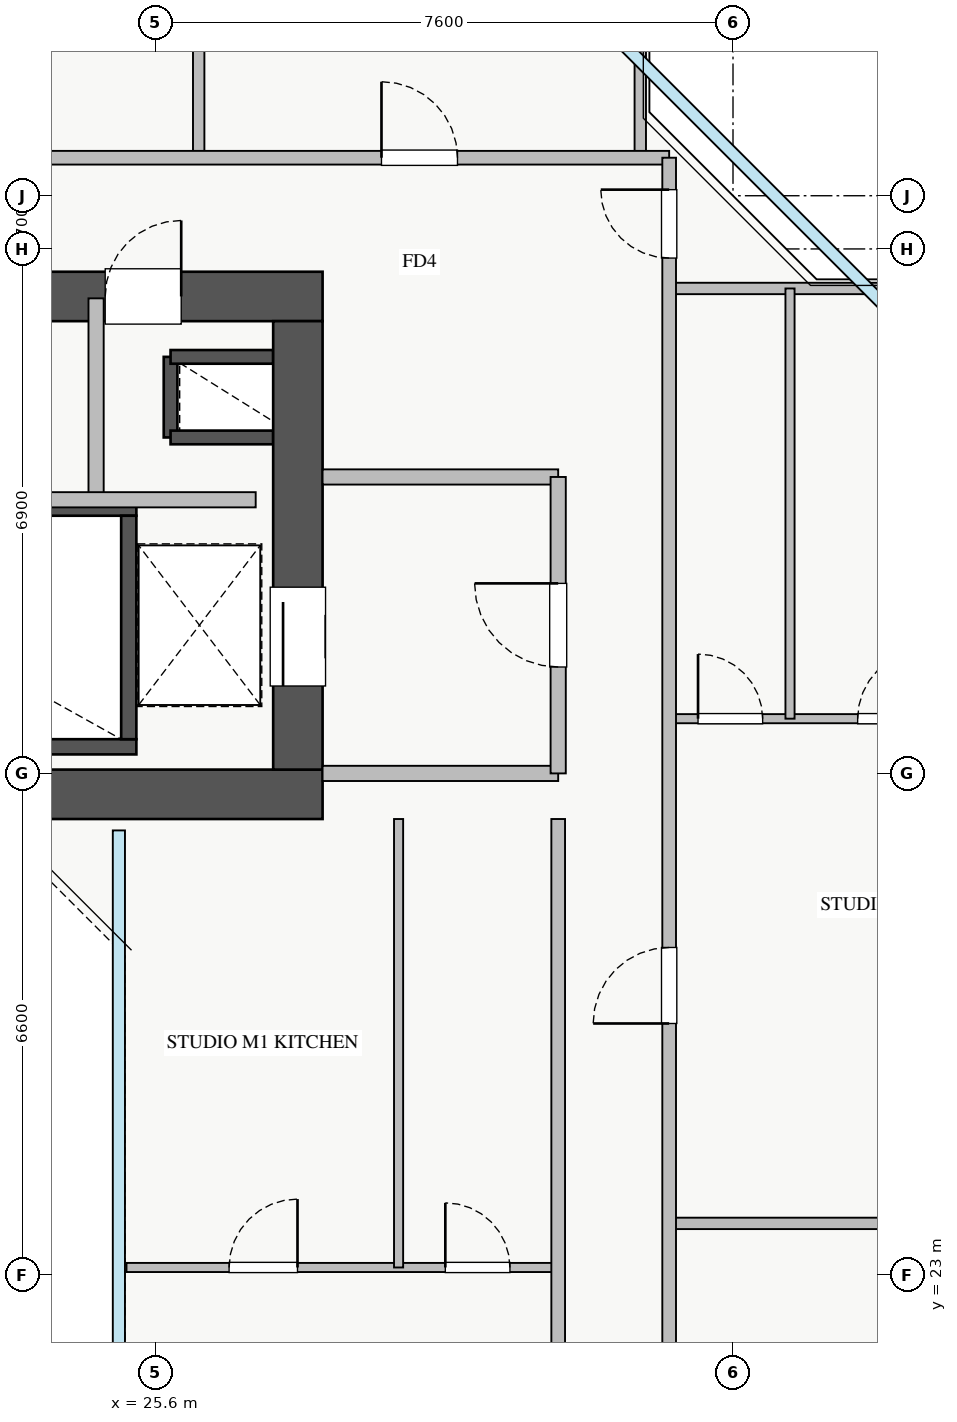
"""IFC4 building model, lengths in metres.
Left out: names, types, materials, properties, quantities, classifications, styles, units other than length and angle.
Written with IfcOpenShell. Run it as: python <this file> out.ifc"""

import sys

from ifc_helpers import new_model, si_unit, direction, frame, frame_2d, origin, place, context, subcontext, project, spatial, rectangle, extrude, source, transform, mapped, element, fill, save


model = new_model("IFC4")
c1 = context("Model", 3, precision=1e-05, world=origin(), true_north=direction((0.0, 1.0)))
c2 = subcontext(c1, "Body", "Model", "MODEL_VIEW")
j1 = project(units=[si_unit("LENGTHUNIT", "METRE"), si_unit("PLANEANGLEUNIT", "RADIAN")], contexts=[c1])
p1 = place(None, origin())
s1 = spatial("IfcSite", under=j1, at=p1, CompositionType="ELEMENT")
p2 = place(p1, origin())
s2 = spatial("IfcBuilding", under=s1, at=p2, CompositionType="ELEMENT")
p3 = place(p2, frame((0.0, 0.0, 150.25)))
s3 = spatial("IfcBuildingStorey", under=s2, at=p3, CompositionType="ELEMENT", Elevation=150.25)
p4 = place(p3, frame((25.8, 34.02, 0.0), z_axis=(0.0, 0.0, 1.0), x_axis=(0.0, 1.0, 0.0)))
e1 = element("IfcWall", 1, at=p4, inside=s3, PredefinedType="SHEAR", context=c2, shape_type="SweptSolid", body=[
    extrude(rectangle(XDim=1.06, YDim=0.18, at=frame_2d((0.53, 0.0))), origin(), (0.0, 0.0, 1.0), 3.07),
])
for number, where, z_axis, x_axis in (
    (2, (25.8, 35.08, 0.0), (0.0, 0.0, 1.0), (1.0, 0.0, 0.0)),
    (3, (25.8, 34.02, 0.0), (0.0, 0.0, 1.0), (1.0, 0.0, 0.0)),
):
    element("IfcWall", number, at=place(p3, frame(where, z_axis=z_axis, x_axis=x_axis)), inside=s3, PredefinedType="SHEAR", context=c2, shape_type="SweptSolid", body=[
        extrude(rectangle(XDim=1.35, YDim=0.18, at=frame_2d((0.675, 0.0))), origin(), (0.0, 0.0, 1.0), 3.07),
    ])
p5 = place(p3, frame((18.2, 29.95, 0.0), z_axis=(0.0, 0.0, 1.0), x_axis=(1.0, 0.0, 0.0)))
e4 = element("IfcWall", 4, at=p5, inside=s3, PredefinedType="SHEAR", context=c2, shape_type="SweptSolid", body=[
    extrude(rectangle(XDim=7.15, YDim=0.2, at=frame_2d((3.575, 0.0))), origin(), (0.0, 0.0, 1.0), 3.25),
])
p6 = place(p3, frame((18.2, 33.09, 0.0), z_axis=(0.0, 0.0, 1.0), x_axis=(1.0, 0.0, 0.0)))
e5 = element("IfcWall", 5, at=p6, inside=s3, PredefinedType="SHEAR", context=c2, shape_type="SweptSolid", body=[
    extrude(rectangle(XDim=7.15, YDim=0.2, at=frame_2d((3.575, 0.0))), origin(), (0.0, 0.0, 1.0), 3.25),
])
p7 = place(p6, frame((0.35, 0.0, 0.0)))
e6 = element("IfcOpeningElement", 6, at=p7, cuts=e5, PredefinedType="OPENING", context=c2, shape_type="SweptSolid", body=[
    extrude(rectangle(XDim=1.1, YDim=2.05, at=frame_2d((0.55, 1.025))), frame((0.0, 0.11, 0.0), z_axis=(0.0, -1.0, 0.0), x_axis=(1.0, 0.0, 0.0)), (0.0, 0.0, 1.0), 0.22),
])
p8 = place(p3, frame((25.25, 30.05, 0.0), z_axis=(0.0, 0.0, 1.0), x_axis=(0.0, 1.0, 0.0)))
e7 = element("IfcWall", 7, at=p8, inside=s3, PredefinedType="SHEAR", context=c2, shape_type="SweptSolid", body=[
    extrude(rectangle(XDim=2.94, YDim=0.2, at=frame_2d((1.47, 0.0))), origin(), (0.0, 0.0, 1.0), 3.25),
])
p9 = place(p3, frame((10.2, 29.325, 0.0), z_axis=(0.0, 0.0, 1.0), x_axis=(1.0, 0.0, 0.0)))
e8 = element("IfcWall", 8, at=p9, inside=s3, PredefinedType="SHEAR", context=c2, shape_type="SweptSolid", body=[
    extrude(rectangle(XDim=17.6, YDim=0.65, at=frame_2d((8.8, 0.0))), origin(), (0.0, 0.0, 1.0), 3.25),
])
p10 = place(p3, frame((10.2, 35.875, 0.0), z_axis=(0.0, 0.0, 1.0), x_axis=(1.0, 0.0, 0.0)))
e9 = element("IfcWall", 9, at=p10, inside=s3, PredefinedType="SHEAR", context=c2, shape_type="SweptSolid", body=[
    extrude(rectangle(XDim=17.6, YDim=0.65, at=frame_2d((8.8, 0.0))), origin(), (0.0, 0.0, 1.0), 3.25),
])
p11 = place(p10, frame((1.15, 0.0, 0.0)))
e10 = element("IfcOpeningElement", 10, at=p11, cuts=e9, PredefinedType="OPENING", context=c2, shape_type="SweptSolid", body=[
    extrude(rectangle(XDim=1.1, YDim=2.05, at=frame_2d((0.55, 1.025))), frame((0.0, 0.335, 0.0), z_axis=(0.0, -1.0, 0.0), x_axis=(1.0, 0.0, 0.0)), (0.0, 0.0, 1.0), 0.67),
])
p12 = place(p10, frame((8.3, 0.0, 0.0)))
e11 = element("IfcOpeningElement", 11, at=p12, cuts=e9, PredefinedType="OPENING", context=c2, shape_type="SweptSolid", body=[
    extrude(rectangle(XDim=1.1, YDim=2.05, at=frame_2d((0.55, 1.025))), frame((0.0, 0.335, 0.0), z_axis=(0.0, -1.0, 0.0), x_axis=(1.0, 0.0, 0.0)), (0.0, 0.0, 1.0), 0.67),
])
p13 = place(p10, frame((4.9, 0.0, 0.0)))
e12 = element("IfcOpeningElement", 12, at=p13, cuts=e9, PredefinedType="OPENING", context=c2, shape_type="SweptSolid", body=[
    extrude(rectangle(XDim=1.1, YDim=2.05, at=frame_2d((0.55, 1.025))), frame((0.0, 0.335, 0.0), z_axis=(0.0, -1.0, 0.0), x_axis=(1.0, 0.0, 0.0)), (0.0, 0.0, 1.0), 0.67),
])
p14 = place(p10, frame((14.74, 0.0, 0.0)))
e13 = element("IfcOpeningElement", 13, at=p14, cuts=e9, PredefinedType="OPENING", context=c2, shape_type="SweptSolid", body=[
    extrude(rectangle(XDim=1.0, YDim=2.05, at=frame_2d((0.5, 1.025))), frame((0.0, 0.335, 0.0), z_axis=(0.0, -1.0, 0.0), x_axis=(1.0, 0.0, 0.0)), (0.0, 0.0, 1.0), 0.67),
])
p15 = place(p10, frame((10.25, 0.0, 0.0)))
e14 = element("IfcOpeningElement", 14, at=p15, cuts=e9, PredefinedType="OPENING", context=c2, shape_type="SweptSolid", body=[
    extrude(rectangle(XDim=1.0, YDim=2.05, at=frame_2d((0.5, 1.025))), frame((0.0, 0.335, 0.0), z_axis=(0.0, -1.0, 0.0), x_axis=(1.0, 0.0, 0.0)), (0.0, 0.0, 1.0), 0.67),
])
p16 = place(p10, frame((12.7, 0.0, 0.0)))
e15 = element("IfcOpeningElement", 15, at=p16, cuts=e9, PredefinedType="OPENING", context=c2, shape_type="SweptSolid", body=[
    extrude(rectangle(XDim=1.0, YDim=2.05, at=frame_2d((0.5, 1.025))), frame((0.0, 0.335, 0.0), z_axis=(0.0, -1.0, 0.0), x_axis=(1.0, 0.0, 0.0)), (0.0, 0.0, 1.0), 0.67),
])
p17 = place(p3, frame((27.475, 29.65, 0.0), z_axis=(0.0, 0.0, 1.0), x_axis=(0.0, 1.0, 0.0)))
e16 = element("IfcWall", 16, at=p17, inside=s3, PredefinedType="SHEAR", context=c2, shape_type="SweptSolid", body=[
    extrude(rectangle(XDim=5.9, YDim=0.65, at=frame_2d((2.95, 0.0))), origin(), (0.0, 0.0, 1.0), 3.25),
])
p18 = place(p17, frame((1.1, 0.0, 0.0)))
e17 = element("IfcOpeningElement", 17, at=p18, cuts=e16, PredefinedType="OPENING", context=c2, shape_type="SweptSolid", body=[
    extrude(rectangle(XDim=1.3, YDim=2.05, at=frame_2d((0.65, 1.025))), frame((0.0, 0.335, 0.0), z_axis=(0.0, -1.0, 0.0), x_axis=(1.0, 0.0, 0.0)), (0.0, 0.0, 1.0), 0.67),
])
for number, where, z_axis, x_axis in (
    (18, (27.8, 29.6, 0.0), (0.0, 0.0, 1.0), (1.0, 0.0, 0.0)),
    (19, (27.8, 33.5, 0.0), (0.0, 0.0, 1.0), (1.0, 0.0, 0.0)),
):
    element("IfcWall", number, at=place(p3, frame(where, z_axis=z_axis, x_axis=x_axis)), inside=s3, PredefinedType="PARTITIONING", context=c2, shape_type="SweptSolid", body=[
        extrude(rectangle(XDim=3.1, YDim=0.2, at=frame_2d((1.55, 0.0))), origin(), (0.0, 0.0, 1.0), 3.07),
    ])
p19 = place(p3, frame((30.9, 29.6, 0.0), z_axis=(0.0, 0.0, 1.0), x_axis=(0.0, 1.0, 0.0)))
e20 = element("IfcWall", 20, at=p19, inside=s3, PredefinedType="PARTITIONING", context=c2, shape_type="SweptSolid", body=[
    extrude(rectangle(XDim=3.9, YDim=0.2, at=frame_2d((1.95, 0.0))), origin(), (0.0, 0.0, 1.0), 3.07),
])
p20 = place(p19, frame((1.4, 0.0, 0.0)))
e21 = element("IfcOpeningElement", 21, at=p20, cuts=e20, PredefinedType="OPENING", context=c2, shape_type="SweptSolid", body=[
    extrude(rectangle(XDim=1.1, YDim=2.05, at=frame_2d((0.55, 1.025))), frame((0.0, 0.11, 0.0), z_axis=(0.0, -1.0, 0.0), x_axis=(1.0, 0.0, 0.0)), (0.0, 0.0, 1.0), 0.22),
])
p21 = place(p3, frame((24.82, 33.2, 0.0), z_axis=(0.0, 0.0, 1.0), x_axis=(0.0, 1.0, 0.0)))
e22 = element("IfcWall", 22, at=p21, inside=s3, PredefinedType="PARTITIONING", context=c2, shape_type="SweptSolid", body=[
    extrude(rectangle(XDim=2.65, YDim=0.2, at=frame_2d((1.325, 0.0))), origin(), (0.0, 0.0, 1.0), 3.07),
])
p22 = place(p3, frame((21.75, 33.2, 0.0), z_axis=(0.0, 0.0, 1.0), x_axis=(1.0, 0.0, 0.0)))
e23 = element("IfcWall", 23, at=p22, inside=s3, PredefinedType="PARTITIONING", context=c2, shape_type="SweptSolid", body=[
    extrude(rectangle(XDim=5.17, YDim=0.2, at=frame_2d((2.585, 0.0))), origin(), (0.0, 0.0, 1.0), 3.07),
])
for number, where, z_axis, x_axis in (
    (24, (26.17, 37.7, 0.0), (0.0, 0.0, 1.0), (0.0, 1.0, 0.0)),
    (25, (31.98, 37.7, 0.0), (0.0, 0.0, 1.0), (0.0, 1.0, 0.0)),
):
    element("IfcWall", number, at=place(p3, frame(where, z_axis=z_axis, x_axis=x_axis)), inside=s3, PredefinedType="PARTITIONING", context=c2, shape_type="SweptSolid", body=[
        extrude(rectangle(XDim=2.95, YDim=0.15, at=frame_2d((1.475, 0.0))), origin(), (0.0, 0.0, 1.0), 3.07),
    ])
p23 = place(p3, frame((8.75, 37.7, 0.0), z_axis=(0.0, 0.0, 1.0), x_axis=(1.0, 0.0, 0.0)))
e26 = element("IfcWall", 26, at=p23, inside=s3, PredefinedType="PARTITIONING", context=c2, shape_type="SweptSolid", body=[
    extrude(rectangle(XDim=23.61, YDim=0.18, at=frame_2d((11.805, 0.0))), origin(), (0.0, 0.0, 1.0), 3.07),
])
p24 = place(p23, frame((2.795, 0.0, 0.0)))
e27 = element("IfcOpeningElement", 27, at=p24, cuts=e26, PredefinedType="OPENING", context=c2, shape_type="SweptSolid", body=[
    extrude(rectangle(XDim=1.0, YDim=2.05, at=frame_2d((0.5, 1.025))), frame((0.0, 0.1, 0.0), z_axis=(0.0, -1.0, 0.0), x_axis=(1.0, 0.0, 0.0)), (0.0, 0.0, 1.0), 0.2),
])
p25 = place(p23, frame((7.97, 0.0, 0.0)))
e28 = element("IfcOpeningElement", 28, at=p25, cuts=e26, PredefinedType="OPENING", context=c2, shape_type="SweptSolid", body=[
    extrude(rectangle(XDim=1.0, YDim=2.05, at=frame_2d((0.5, 1.025))), frame((0.0, 0.1, 0.0), z_axis=(0.0, -1.0, 0.0), x_axis=(1.0, 0.0, 0.0)), (0.0, 0.0, 1.0), 0.2),
])
p26 = place(p23, frame((13.385, 0.0, 0.0)))
e29 = element("IfcOpeningElement", 29, at=p26, cuts=e26, PredefinedType="OPENING", context=c2, shape_type="SweptSolid", body=[
    extrude(rectangle(XDim=1.0, YDim=2.05, at=frame_2d((0.5, 1.025))), frame((0.0, 0.1, 0.0), z_axis=(0.0, -1.0, 0.0), x_axis=(1.0, 0.0, 0.0)), (0.0, 0.0, 1.0), 0.2),
])
p27 = place(p23, frame((19.825, 0.0, 0.0)))
e30 = element("IfcOpeningElement", 30, at=p27, cuts=e26, PredefinedType="OPENING", context=c2, shape_type="SweptSolid", body=[
    extrude(rectangle(XDim=1.0, YDim=2.05, at=frame_2d((0.5, 1.025))), frame((0.0, 0.1, 0.0), z_axis=(0.0, -1.0, 0.0), x_axis=(1.0, 0.0, 0.0)), (0.0, 0.0, 1.0), 0.2),
])
p28 = place(p3, frame((32.36, 35.98, 0.0), z_axis=(0.0, 0.0, 1.0), x_axis=(1.0, 0.0, 0.0)))
e31 = element("IfcWall", 31, at=p28, inside=s3, PredefinedType="PARTITIONING", context=c2, shape_type="SweptSolid", body=[
    extrude(rectangle(XDim=4.29, YDim=0.15, at=frame_2d((2.145, 0.0))), origin(), (0.0, 0.0, 1.0), 3.07),
])
p29 = place(p3, frame((32.36, 30.32, 0.0), z_axis=(0.0, 0.0, 1.0), x_axis=(1.0, 0.0, 0.0)))
e32 = element("IfcWall", 32, at=p29, inside=s3, PredefinedType="PLUMBINGWALL", context=c2, shape_type="SweptSolid", body=[
    extrude(rectangle(XDim=4.29, YDim=0.12, at=frame_2d((2.145, 0.0))), origin(), (0.0, 0.0, 1.0), 3.07),
])
p30 = place(p29, frame((0.38, 0.0, 0.0)))
e33 = element("IfcOpeningElement", 33, at=p30, cuts=e32, PredefinedType="OPENING", context=c2, shape_type="SweptSolid", body=[
    extrude(rectangle(XDim=0.85, YDim=2.05, at=frame_2d((0.425, 1.025))), frame((0.0, 0.07, 0.0), z_axis=(0.0, -1.0, 0.0), x_axis=(1.0, 0.0, 0.0)), (0.0, 0.0, 1.0), 0.14),
])
p31 = place(p29, frame((2.48, 0.0, 0.0)))
e34 = element("IfcOpeningElement", 34, at=p31, cuts=e32, PredefinedType="OPENING", context=c2, shape_type="SweptSolid", body=[
    extrude(rectangle(XDim=0.9, YDim=2.05, at=frame_2d((0.45, 1.025))), frame((0.0, 0.07, 0.0), z_axis=(0.0, -1.0, 0.0), x_axis=(1.0, 0.0, 0.0)), (0.0, 0.0, 1.0), 0.14),
])
p32 = place(p3, frame((33.95, 30.32, 0.0), z_axis=(0.0, 0.0, 1.0), x_axis=(0.0, 1.0, 0.0)))
e35 = element("IfcWall", 35, at=p32, inside=s3, PredefinedType="PLUMBINGWALL", context=c2, shape_type="SweptSolid", body=[
    extrude(rectangle(XDim=5.66, YDim=0.12, at=frame_2d((2.83, 0.0))), origin(), (0.0, 0.0, 1.0), 3.07),
])
p33 = place(p3, frame((32.36, 23.68, 0.0), z_axis=(0.0, 0.0, 1.0), x_axis=(1.0, 0.0, 0.0)))
e36 = element("IfcWall", 36, at=p33, inside=s3, PredefinedType="PARTITIONING", context=c2, shape_type="SweptSolid", body=[
    extrude(rectangle(XDim=4.29, YDim=0.15, at=frame_2d((2.145, 0.0))), origin(), (0.0, 0.0, 1.0), 3.07),
])
p34 = place(p3, frame((32.36, 8.3, 0.0), z_axis=(0.0, 0.0, 1.0), x_axis=(0.0, 1.0, 0.0)))
e37 = element("IfcWall", 37, at=p34, inside=s3, PredefinedType="PARTITIONING", context=c2, shape_type="SweptSolid", body=[
    extrude(rectangle(XDim=29.4, YDim=0.18, at=frame_2d((14.7, 0.0))), origin(), (0.0, 0.0, 1.0), 3.07),
])
p35 = place(p34, frame((28.08, 0.0, 0.0)))
e38 = element("IfcOpeningElement", 38, at=p35, cuts=e37, PredefinedType="OPENING", context=c2, shape_type="SweptSolid", body=[
    extrude(rectangle(XDim=0.9, YDim=2.05, at=frame_2d((0.45, 1.025))), frame((0.0, 0.1, 0.0), z_axis=(0.0, -1.0, 0.0), x_axis=(1.0, 0.0, 0.0)), (0.0, 0.0, 1.0), 0.2),
])
p36 = place(p34, frame((0.42, 0.0, 0.0)))
e39 = element("IfcOpeningElement", 39, at=p36, cuts=e37, PredefinedType="OPENING", context=c2, shape_type="SweptSolid", body=[
    extrude(rectangle(XDim=0.9, YDim=2.05, at=frame_2d((0.45, 1.025))), frame((0.0, 0.1, 0.0), z_axis=(0.0, -1.0, 0.0), x_axis=(1.0, 0.0, 0.0)), (0.0, 0.0, 1.0), 0.2),
])
p37 = place(p34, frame((8.05, 0.0, 0.0)))
e40 = element("IfcOpeningElement", 40, at=p37, cuts=e37, PredefinedType="OPENING", context=c2, shape_type="SweptSolid", body=[
    extrude(rectangle(XDim=1.0, YDim=2.05, at=frame_2d((0.5, 1.025))), frame((0.0, 0.1, 0.0), z_axis=(0.0, -1.0, 0.0), x_axis=(1.0, 0.0, 0.0)), (0.0, 0.0, 1.0), 0.2),
])
p38 = place(p34, frame((18.01, 0.0, 0.0)))
e41 = element("IfcOpeningElement", 41, at=p38, cuts=e37, PredefinedType="OPENING", context=c2, shape_type="SweptSolid", body=[
    extrude(rectangle(XDim=1.0, YDim=2.05, at=frame_2d((0.5, 1.025))), frame((0.0, 0.1, 0.0), z_axis=(0.0, -1.0, 0.0), x_axis=(1.0, 0.0, 0.0)), (0.0, 0.0, 1.0), 0.2),
])
p39 = place(p3, frame((25.22, 23.1, 0.0), z_axis=(0.0, 0.0, 1.0), x_axis=(1.0, 0.0, 0.0)))
e42 = element("IfcWall", 42, at=p39, inside=s3, PredefinedType="PLUMBINGWALL", context=c2, shape_type="SweptSolid", body=[
    extrude(rectangle(XDim=5.68, YDim=0.12, at=frame_2d((2.84, 0.0))), origin(), (0.0, 0.0, 1.0), 3.07),
])
p40 = place(p39, frame((1.35, 0.0, 0.0)))
e43 = element("IfcOpeningElement", 43, at=p40, cuts=e42, PredefinedType="OPENING", context=c2, shape_type="SweptSolid", body=[
    extrude(rectangle(XDim=0.9, YDim=2.05, at=frame_2d((0.45, 1.025))), frame((0.0, 0.07, 0.0), z_axis=(0.0, -1.0, 0.0), x_axis=(1.0, 0.0, 0.0)), (0.0, 0.0, 1.0), 0.14),
])
p41 = place(p39, frame((4.195, 0.0, 0.0)))
e44 = element("IfcOpeningElement", 44, at=p41, cuts=e42, PredefinedType="OPENING", context=c2, shape_type="SweptSolid", body=[
    extrude(rectangle(XDim=0.85, YDim=2.05, at=frame_2d((0.425, 1.025))), frame((0.0, 0.07, 0.0), z_axis=(0.0, -1.0, 0.0), x_axis=(1.0, 0.0, 0.0)), (0.0, 0.0, 1.0), 0.14),
])
p42 = place(p3, frame((28.8, 23.1, 0.0), z_axis=(0.0, 0.0, 1.0), x_axis=(0.0, 1.0, 0.0)))
e45 = element("IfcWall", 45, at=p42, inside=s3, PredefinedType="PLUMBINGWALL", context=c2, shape_type="SweptSolid", body=[
    extrude(rectangle(XDim=5.9, YDim=0.12, at=frame_2d((2.95, 0.0))), origin(), (0.0, 0.0, 1.0), 3.07),
])
p43 = place(p3, frame((30.9, 17.0, 0.0), z_axis=(0.0, 0.0, 1.0), x_axis=(0.0, 1.0, 0.0)))
e46 = element("IfcWall", 46, at=p43, inside=s3, PredefinedType="PARTITIONING", context=c2, shape_type="SweptSolid", body=[
    extrude(rectangle(XDim=12.0, YDim=0.18, at=frame_2d((6.0, 0.0))), origin(), (0.0, 0.0, 1.0), 3.07),
])
p44 = place(p43, frame((2.36, 0.0, 0.0)))
e47 = element("IfcOpeningElement", 47, at=p44, cuts=e46, PredefinedType="OPENING", context=c2, shape_type="SweptSolid", body=[
    extrude(rectangle(XDim=1.0, YDim=2.05, at=frame_2d((0.5, 1.025))), frame((0.0, 0.1, 0.0), z_axis=(0.0, -1.0, 0.0), x_axis=(1.0, 0.0, 0.0)), (0.0, 0.0, 1.0), 0.2),
])
m1 = source(origin(), c2, "Body", "SweptSolid", [
    extrude(rectangle(XDim=1.3, YDim=2.05, at=frame_2d((0.65, 1.025))), frame((0.0, 0.025, 0.0), z_axis=(0.0, -1.0, 0.0), x_axis=(1.0, 0.0, 0.0)), (0.0, 0.0, 1.0), 0.05),
])
p45 = place(p18, origin())
e48 = element("IfcDoor", 48, at=p45, inside=s3, OperationType="SLIDING_TO_LEFT", PredefinedType="DOOR", context=c2, shape_type="MappedRepresentation", body=[
    mapped(m1, transform((0.0, 0.0, 0.0), x_axis=(1.0, 0.0, 0.0), y_axis=(0.0, 1.0, 0.0), z_axis=(0.0, 0.0, 1.0), scale=1.0)),
])
fill(e17, e48)
m2 = source(origin(), c2, "Body", "SweptSolid", [
    extrude(rectangle(XDim=1.0, YDim=2.05, at=frame_2d((0.5, 1.025))), frame((0.0, 0.025, 0.0), z_axis=(0.0, -1.0, 0.0), x_axis=(1.0, 0.0, 0.0)), (0.0, 0.0, 1.0), 0.05),
])
p46 = place(p14, origin())
e49 = element("IfcDoor", 49, at=p46, inside=s3, OperationType="SINGLE_SWING_RIGHT", PredefinedType="DOOR", context=c2, shape_type="MappedRepresentation", body=[
    mapped(m2, transform((0.0, 0.0, 0.0), x_axis=(1.0, 0.0, 0.0), y_axis=(0.0, 1.0, 0.0), z_axis=(0.0, 0.0, 1.0), scale=1.0)),
])
fill(e13, e49)
m3 = source(origin(), c2, "Body", "SweptSolid", [
    extrude(rectangle(XDim=1.1, YDim=2.05, at=frame_2d((0.55, 1.025))), frame((0.0, 0.025, 0.0), z_axis=(0.0, -1.0, 0.0), x_axis=(1.0, 0.0, 0.0)), (0.0, 0.0, 1.0), 0.05),
])
p47 = place(p20, origin())
e50 = element("IfcDoor", 50, at=p47, inside=s3, OperationType="SINGLE_SWING_RIGHT", PredefinedType="DOOR", context=c2, shape_type="MappedRepresentation", body=[
    mapped(m3, transform((0.0, 0.0, 0.0), x_axis=(1.0, 0.0, 0.0), y_axis=(0.0, 1.0, 0.0), z_axis=(0.0, 0.0, 1.0), scale=1.0)),
])
fill(e21, e50)
p48 = place(p27, origin())
e51 = element("IfcDoor", 51, at=p48, inside=s3, OperationType="SINGLE_SWING_LEFT", PredefinedType="DOOR", context=c2, shape_type="MappedRepresentation", body=[
    mapped(m2, transform((0.0, 0.0, 0.0), x_axis=(1.0, 0.0, 0.0), y_axis=(0.0, 1.0, 0.0), z_axis=(0.0, 0.0, 1.0), scale=1.0)),
])
fill(e30, e51)
m4 = source(origin(), c2, "Body", "SweptSolid", [
    extrude(rectangle(XDim=0.85, YDim=2.05, at=frame_2d((0.425, 1.025))), frame((0.0, 0.025, 0.0), z_axis=(0.0, -1.0, 0.0), x_axis=(1.0, 0.0, 0.0)), (0.0, 0.0, 1.0), 0.05),
])
p49 = place(p30, origin())
e52 = element("IfcDoor", 52, at=p49, inside=s3, OperationType="SINGLE_SWING_LEFT", PredefinedType="DOOR", context=c2, shape_type="MappedRepresentation", body=[
    mapped(m4, transform((0.0, 0.0, 0.0), x_axis=(1.0, 0.0, 0.0), y_axis=(0.0, 1.0, 0.0), z_axis=(0.0, 0.0, 1.0), scale=1.0)),
])
fill(e33, e52)
m5 = source(origin(), c2, "Body", "SweptSolid", [
    extrude(rectangle(XDim=0.9, YDim=2.05, at=frame_2d((0.45, 1.025))), frame((0.0, 0.025, 0.0), z_axis=(0.0, -1.0, 0.0), x_axis=(1.0, 0.0, 0.0)), (0.0, 0.0, 1.0), 0.05),
])
p50 = place(p31, origin())
e53 = element("IfcDoor", 53, at=p50, inside=s3, OperationType="SINGLE_SWING_RIGHT", PredefinedType="DOOR", context=c2, shape_type="MappedRepresentation", body=[
    mapped(m5, transform((0.0, 0.0, 0.0), x_axis=(1.0, 0.0, 0.0), y_axis=(0.0, 1.0, 0.0), z_axis=(0.0, 0.0, 1.0), scale=1.0)),
])
fill(e34, e53)
p51 = place(p35, origin())
e54 = element("IfcDoor", 54, at=p51, inside=s3, OperationType="SINGLE_SWING_RIGHT", PredefinedType="DOOR", context=c2, shape_type="MappedRepresentation", body=[
    mapped(m5, transform((0.0, 0.0, 0.0), x_axis=(1.0, 0.0, 0.0), y_axis=(0.0, 1.0, 0.0), z_axis=(0.0, 0.0, 1.0), scale=1.0)),
])
fill(e38, e54)
p52 = place(p38, origin())
e55 = element("IfcDoor", 55, at=p52, inside=s3, OperationType="SINGLE_SWING_LEFT", PredefinedType="DOOR", context=c2, shape_type="MappedRepresentation", body=[
    mapped(m2, transform((0.0, 0.0, 0.0), x_axis=(1.0, 0.0, 0.0), y_axis=(0.0, 1.0, 0.0), z_axis=(0.0, 0.0, 1.0), scale=1.0)),
])
fill(e41, e55)
p53 = place(p40, origin())
e56 = element("IfcDoor", 56, at=p53, inside=s3, OperationType="SINGLE_SWING_RIGHT", PredefinedType="DOOR", context=c2, shape_type="MappedRepresentation", body=[
    mapped(m5, transform((0.0, 0.0, 0.0), x_axis=(1.0, 0.0, 0.0), y_axis=(0.0, 1.0, 0.0), z_axis=(0.0, 0.0, 1.0), scale=1.0)),
])
fill(e43, e56)
p54 = place(p41, origin())
e57 = element("IfcDoor", 57, at=p54, inside=s3, OperationType="SINGLE_SWING_LEFT", PredefinedType="DOOR", context=c2, shape_type="MappedRepresentation", body=[
    mapped(m4, transform((0.0, 0.0, 0.0), x_axis=(1.0, 0.0, 0.0), y_axis=(0.0, 1.0, 0.0), z_axis=(0.0, 0.0, 1.0), scale=1.0)),
])
fill(e44, e57)
save(model, sys.argv[1])
